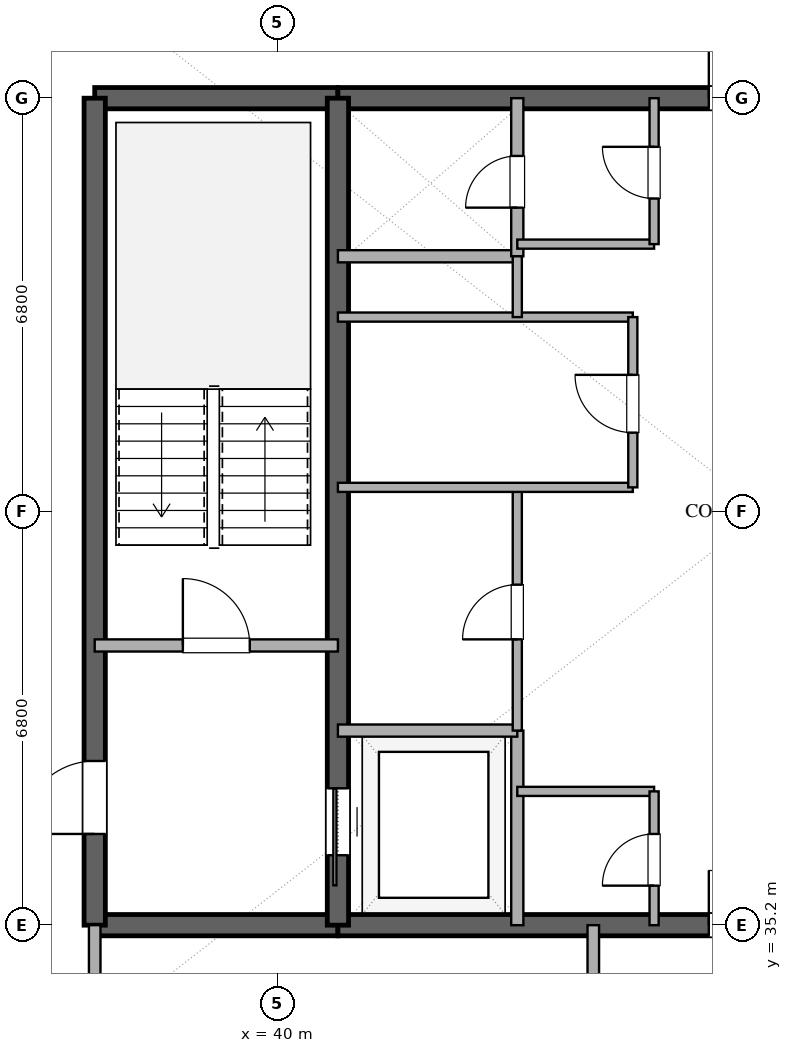
"""IFC4 building model, lengths in metres.
Left out: names, types, materials, properties, quantities, classifications, styles, units other than length and angle.
Written with IfcOpenShell. Run it as: python <this file> out.ifc"""

import sys

from ifc_helpers import new_model, si_unit, direction, frame, frame_2d, origin, place, context, subcontext, project, spatial, rectangle, extrude, element, fill, save


model = new_model("IFC4")
c1 = context("Model", 3, precision=1e-05, world=origin(), true_north=direction((0.0, 1.0)))
c2 = subcontext(c1, "Body", "Model", "MODEL_VIEW")
j1 = project(units=[si_unit("LENGTHUNIT", "METRE"), si_unit("PLANEANGLEUNIT", "RADIAN")], contexts=[c1])
p1 = place(None, origin())
s1 = spatial("IfcSite", under=j1, at=p1, CompositionType="ELEMENT")
p2 = place(p1, origin())
s2 = spatial("IfcBuilding", under=s1, at=p2, CompositionType="ELEMENT")
p3 = place(p2, frame((0.0, 0.0, 309.0)))
s3 = spatial("IfcBuildingStorey", under=s2, at=p3, CompositionType="ELEMENT", Elevation=309.0)
p4 = place(p3, frame((37.0, 35.2, 0.0), z_axis=(0.0, 0.0, 1.0), x_axis=(1.0, 0.0, 0.0)))
e1 = element("IfcWall", 1, at=p4, inside=s3, PredefinedType="SHEAR", context=c2, shape_type="SweptSolid", body=[
    extrude(rectangle(XDim=4.0, YDim=0.35, at=frame_2d((2.0, 0.0))), origin(), (0.0, 0.0, 1.0), 3.37),
])
p5 = place(p3, frame((41.0, 35.2, 0.0), z_axis=(0.0, 0.0, 1.0), x_axis=(1.0, 0.0, 0.0)))
e2 = element("IfcWall", 2, at=p5, inside=s3, PredefinedType="SHEAR", context=c2, shape_type="SweptSolid", body=[
    extrude(rectangle(XDim=14.0, YDim=0.35, at=frame_2d((7.0, 0.0))), origin(), (0.0, 0.0, 1.0), 3.37),
])
p6 = place(p5, frame((6.1, 0.0, 0.0)))
e3 = element("IfcOpeningElement", 3, at=p6, cuts=e2, PredefinedType="OPENING", context=c2, shape_type="SweptSolid", body=[
    extrude(rectangle(XDim=1.8, YDim=2.25, at=frame_2d((0.9, 1.125))), frame((0.0, 0.185, 0.0), z_axis=(0.0, -1.0, 0.0), x_axis=(1.0, 0.0, 0.0)), (0.0, 0.0, 1.0), 0.37),
])
p7 = place(p3, frame((37.0, 48.8, 0.0), z_axis=(0.0, 0.0, 1.0), x_axis=(1.0, 0.0, 0.0)))
e4 = element("IfcWall", 4, at=p7, inside=s3, PredefinedType="SHEAR", context=c2, shape_type="SweptSolid", body=[
    extrude(rectangle(XDim=4.0, YDim=0.35, at=frame_2d((2.0, 0.0))), origin(), (0.0, 0.0, 1.0), 3.37),
])
p8 = place(p3, frame((41.0, 48.8, 0.0), z_axis=(0.0, 0.0, 1.0), x_axis=(1.0, 0.0, 0.0)))
e5 = element("IfcWall", 5, at=p8, inside=s3, PredefinedType="SHEAR", context=c2, shape_type="SweptSolid", body=[
    extrude(rectangle(XDim=14.0, YDim=0.35, at=frame_2d((7.0, 0.0))), origin(), (0.0, 0.0, 1.0), 3.37),
])
p9 = place(p8, frame((6.1, 0.0, 0.0)))
e6 = element("IfcOpeningElement", 6, at=p9, cuts=e5, PredefinedType="OPENING", context=c2, shape_type="SweptSolid", body=[
    extrude(rectangle(XDim=1.8, YDim=2.25, at=frame_2d((0.9, 1.125))), frame((0.0, 0.185, 0.0), z_axis=(0.0, -1.0, 0.0), x_axis=(1.0, 0.0, 0.0)), (0.0, 0.0, 1.0), 0.37),
])
p10 = place(p3, frame((37.0, 35.2, 0.0), z_axis=(0.0, 0.0, 1.0), x_axis=(0.0, 1.0, 0.0)))
e7 = element("IfcWall", 7, at=p10, inside=s3, PredefinedType="SHEAR", context=c2, shape_type="SweptSolid", body=[
    extrude(rectangle(XDim=13.6, YDim=0.35, at=frame_2d((6.8, 0.0))), origin(), (0.0, 0.0, 1.0), 3.37),
])
p11 = place(p10, frame((1.5, 0.0, 0.0)))
e8 = element("IfcOpeningElement", 8, at=p11, cuts=e7, PredefinedType="OPENING", context=c2, shape_type="SweptSolid", body=[
    extrude(rectangle(XDim=1.2, YDim=2.15, at=frame_2d((0.6, 1.075))), frame((0.0, 0.185, 0.0), z_axis=(0.0, -1.0, 0.0), x_axis=(1.0, 0.0, 0.0)), (0.0, 0.0, 1.0), 0.37),
])
p12 = place(p3, frame((41.0, 35.2, 0.0), z_axis=(0.0, 0.0, 1.0), x_axis=(0.0, 1.0, 0.0)))
e9 = element("IfcWall", 9, at=p12, inside=s3, PredefinedType="SHEAR", context=c2, shape_type="SweptSolid", body=[
    extrude(rectangle(XDim=13.6, YDim=0.35, at=frame_2d((6.8, 0.0))), origin(), (0.0, 0.0, 1.0), 3.37),
])
p13 = place(p12, frame((1.15, 0.0, 0.0)))
e10 = element("IfcOpeningElement", 10, at=p13, cuts=e9, PredefinedType="OPENING", context=c2, shape_type="SweptSolid", body=[
    extrude(rectangle(XDim=1.1, YDim=2.2, at=frame_2d((0.55, 1.1))), frame((0.0, 0.185, 0.0), z_axis=(0.0, -1.0, 0.0), x_axis=(1.0, 0.0, 0.0)), (0.0, 0.0, 1.0), 0.37),
])
p14 = place(p3, frame((37.0, 39.8, 0.0), z_axis=(0.0, 0.0, 1.0), x_axis=(1.0, 0.0, 0.0)))
e11 = element("IfcWall", 11, at=p14, inside=s3, PredefinedType="SOLIDWALL", context=c2, shape_type="SweptSolid", body=[
    extrude(rectangle(XDim=4.0, YDim=0.2, at=frame_2d((2.0, 0.0))), origin(), (0.0, 0.0, 1.0), 2.73),
])
p15 = place(p14, frame((1.45, 0.0, 0.0)))
e12 = element("IfcOpeningElement", 12, at=p15, cuts=e11, PredefinedType="OPENING", context=c2, shape_type="SweptSolid", body=[
    extrude(rectangle(XDim=1.1, YDim=2.15, at=frame_2d((0.55, 1.075))), frame((0.0, 0.11, 0.0), z_axis=(0.0, -1.0, 0.0), x_axis=(1.0, 0.0, 0.0)), (0.0, 0.0, 1.0), 0.22),
])
p16 = place(p3, frame((43.95, 35.2, 0.0), z_axis=(0.0, 0.0, 1.0), x_axis=(0.0, 1.0, 0.0)))
e13 = element("IfcWall", 13, at=p16, inside=s3, PredefinedType="SOLIDWALL", context=c2, shape_type="SweptSolid", body=[
    extrude(rectangle(XDim=3.2, YDim=0.2, at=frame_2d((1.6, 0.0))), origin(), (0.0, 0.0, 1.0), 2.73),
])
for number, where, z_axis, x_axis in (
    (14, (41.0, 38.4, 0.0), (0.0, 0.0, 1.0), (1.0, 0.0, 0.0)),
    (15, (41.0, 46.2, 0.0), (0.0, 0.0, 1.0), (1.0, 0.0, 0.0)),
):
    element("IfcWall", number, at=place(p3, frame(where, z_axis=z_axis, x_axis=x_axis)), inside=s3, PredefinedType="SOLIDWALL", context=c2, shape_type="SweptSolid", body=[
        extrude(rectangle(XDim=2.95, YDim=0.2, at=frame_2d((1.475, 0.0))), origin(), (0.0, 0.0, 1.0), 2.73),
    ])
p17 = place(p3, frame((43.95, 46.2, 0.0), z_axis=(0.0, 0.0, 1.0), x_axis=(0.0, 1.0, 0.0)))
e16 = element("IfcWall", 16, at=p17, inside=s3, PredefinedType="SOLIDWALL", context=c2, shape_type="SweptSolid", body=[
    extrude(rectangle(XDim=2.6, YDim=0.2, at=frame_2d((1.3, 0.0))), origin(), (0.0, 0.0, 1.0), 2.73),
])
p18 = place(p17, frame((0.8, 0.0, 0.0)))
e17 = element("IfcOpeningElement", 17, at=p18, cuts=e16, PredefinedType="OPENING", context=c2, shape_type="SweptSolid", body=[
    extrude(rectangle(XDim=0.85, YDim=2.15, at=frame_2d((0.425, 1.075))), frame((0.0, 0.11, 0.0), z_axis=(0.0, -1.0, 0.0), x_axis=(1.0, 0.0, 0.0)), (0.0, 0.0, 1.0), 0.22),
])
p19 = place(p3, frame((43.95, 38.4, 0.0), z_axis=(0.0, 0.0, 1.0), x_axis=(0.0, 1.0, 0.0)))
e18 = element("IfcWall", 18, at=p19, inside=s3, PredefinedType="PARTITIONING", context=c2, shape_type="SweptSolid", body=[
    extrude(rectangle(XDim=4.0, YDim=0.15, at=frame_2d((2.0, 0.0))), origin(), (0.0, 0.0, 1.0), 2.73),
])
p20 = place(p19, frame((1.5, 0.0, 0.0)))
e19 = element("IfcOpeningElement", 19, at=p20, cuts=e18, PredefinedType="OPENING", context=c2, shape_type="SweptSolid", body=[
    extrude(rectangle(XDim=0.9, YDim=2.15, at=frame_2d((0.45, 1.075))), frame((0.0, 0.085, 0.0), z_axis=(0.0, -1.0, 0.0), x_axis=(1.0, 0.0, 0.0)), (0.0, 0.0, 1.0), 0.17),
])
for number, where, z_axis, x_axis in (
    (20, (41.0, 42.4, 0.0), (0.0, 0.0, 1.0), (1.0, 0.0, 0.0)),
    (21, (41.0, 45.2, 0.0), (0.0, 0.0, 1.0), (1.0, 0.0, 0.0)),
):
    element("IfcWall", number, at=place(p3, frame(where, z_axis=z_axis, x_axis=x_axis)), inside=s3, PredefinedType="PARTITIONING", context=c2, shape_type="SweptSolid", body=[
        extrude(rectangle(XDim=4.85, YDim=0.15, at=frame_2d((2.425, 0.0))), origin(), (0.0, 0.0, 1.0), 2.73),
    ])
p21 = place(p3, frame((43.95, 45.2, 0.0), z_axis=(0.0, 0.0, 1.0), x_axis=(0.0, 1.0, 0.0)))
e22 = element("IfcWall", 22, at=p21, inside=s3, PredefinedType="PARTITIONING", context=c2, shape_type="SweptSolid", body=[
    extrude(rectangle(XDim=1.0, YDim=0.15, at=frame_2d((0.5, 0.0))), origin(), (0.0, 0.0, 1.0), 2.73),
])
p22 = place(p3, frame((45.85, 42.4, 0.0), z_axis=(0.0, 0.0, 1.0), x_axis=(0.0, 1.0, 0.0)))
e23 = element("IfcWall", 23, at=p22, inside=s3, PredefinedType="PARTITIONING", context=c2, shape_type="SweptSolid", body=[
    extrude(rectangle(XDim=2.8, YDim=0.15, at=frame_2d((1.4, 0.0))), origin(), (0.0, 0.0, 1.0), 2.73),
])
p23 = place(p22, frame((0.9, 0.0, 0.0)))
e24 = element("IfcOpeningElement", 24, at=p23, cuts=e23, PredefinedType="OPENING", context=c2, shape_type="SweptSolid", body=[
    extrude(rectangle(XDim=0.95, YDim=2.15, at=frame_2d((0.475, 1.075))), frame((0.0, 0.085, 0.0), z_axis=(0.0, -1.0, 0.0), x_axis=(1.0, 0.0, 0.0)), (0.0, 0.0, 1.0), 0.17),
])
p24 = place(p3, frame((43.95, 37.4, 0.0), z_axis=(0.0, 0.0, 1.0), x_axis=(1.0, 0.0, 0.0)))
e25 = element("IfcWall", 25, at=p24, inside=s3, PredefinedType="PARTITIONING", context=c2, shape_type="SweptSolid", body=[
    extrude(rectangle(XDim=2.25, YDim=0.15, at=frame_2d((1.125, 0.0))), origin(), (0.0, 0.0, 1.0), 2.73),
])
p25 = place(p3, frame((46.2, 35.2, 0.0), z_axis=(0.0, 0.0, 1.0), x_axis=(0.0, 1.0, 0.0)))
e26 = element("IfcWall", 26, at=p25, inside=s3, PredefinedType="PARTITIONING", context=c2, shape_type="SweptSolid", body=[
    extrude(rectangle(XDim=2.2, YDim=0.15, at=frame_2d((1.1, 0.0))), origin(), (0.0, 0.0, 1.0), 2.73),
])
p26 = place(p25, frame((0.65, 0.0, 0.0)))
e27 = element("IfcOpeningElement", 27, at=p26, cuts=e26, PredefinedType="OPENING", context=c2, shape_type="SweptSolid", body=[
    extrude(rectangle(XDim=0.85, YDim=2.15, at=frame_2d((0.425, 1.075))), frame((0.0, 0.085, 0.0), z_axis=(0.0, -1.0, 0.0), x_axis=(1.0, 0.0, 0.0)), (0.0, 0.0, 1.0), 0.17),
])
p27 = place(p3, frame((43.95, 46.4, 0.0), z_axis=(0.0, 0.0, 1.0), x_axis=(1.0, 0.0, 0.0)))
e28 = element("IfcWall", 28, at=p27, inside=s3, PredefinedType="PARTITIONING", context=c2, shape_type="SweptSolid", body=[
    extrude(rectangle(XDim=2.25, YDim=0.15, at=frame_2d((1.125, 0.0))), origin(), (0.0, 0.0, 1.0), 2.73),
])
p28 = place(p3, frame((46.2, 46.4, 0.0), z_axis=(0.0, 0.0, 1.0), x_axis=(0.0, 1.0, 0.0)))
e29 = element("IfcWall", 29, at=p28, inside=s3, PredefinedType="PARTITIONING", context=c2, shape_type="SweptSolid", body=[
    extrude(rectangle(XDim=2.4, YDim=0.15, at=frame_2d((1.2, 0.0))), origin(), (0.0, 0.0, 1.0), 2.73),
])
p29 = place(p28, frame((0.75, 0.0, 0.0)))
e30 = element("IfcOpeningElement", 30, at=p29, cuts=e29, PredefinedType="OPENING", context=c2, shape_type="SweptSolid", body=[
    extrude(rectangle(XDim=0.85, YDim=2.15, at=frame_2d((0.425, 1.075))), frame((0.0, 0.085, 0.0), z_axis=(0.0, -1.0, 0.0), x_axis=(1.0, 0.0, 0.0)), (0.0, 0.0, 1.0), 0.17),
])
p30 = place(p3, frame((45.2, 33.1, 0.0), z_axis=(0.0, 0.0, 1.0), x_axis=(0.0, 1.0, 0.0)))
e31 = element("IfcWall", 31, at=p30, inside=s3, PredefinedType="PARTITIONING", context=c2, shape_type="SweptSolid", body=[
    extrude(rectangle(XDim=2.1, YDim=0.19, at=frame_2d((1.05, 0.0))), origin(), (0.0, 0.0, 1.0), 2.73),
])
p31 = place(p3, frame((37.0, 34.0, 0.0), z_axis=(0.0, 0.0, 1.0), x_axis=(0.0, 1.0, 0.0)))
e32 = element("IfcWall", 32, at=p31, inside=s3, PredefinedType="PARTITIONING", context=c2, shape_type="SweptSolid", body=[
    extrude(rectangle(XDim=1.2, YDim=0.19, at=frame_2d((0.6, 0.0))), origin(), (0.0, 0.0, 1.0), 2.73),
])
p32 = place(p13, origin())
e33 = element("IfcDoor", 33, at=p32, inside=s3, OperationType="SLIDING_TO_LEFT", PredefinedType="DOOR", context=c2, shape_type="SweptSolid", body=[
    extrude(rectangle(XDim=1.1, YDim=2.2, at=frame_2d((0.55, 1.1))), frame((0.0, 0.025, 0.0), z_axis=(0.0, -1.0, 0.0), x_axis=(1.0, 0.0, 0.0)), (0.0, 0.0, 1.0), 0.05),
])
fill(e10, e33)
p33 = place(p11, origin())
e34 = element("IfcDoor", 34, at=p33, inside=s3, OperationType="SINGLE_SWING_LEFT", PredefinedType="DOOR", context=c2, shape_type="SweptSolid", body=[
    extrude(rectangle(XDim=1.2, YDim=2.15, at=frame_2d((0.6, 1.075))), frame((0.0, 0.025, 0.0), z_axis=(0.0, -1.0, 0.0), x_axis=(1.0, 0.0, 0.0)), (0.0, 0.0, 1.0), 0.05),
])
fill(e8, e34)
p34 = place(p6, origin())
e35 = element("IfcDoor", 35, at=p34, inside=s3, OperationType="DOUBLE_DOOR_SINGLE_SWING", PredefinedType="DOOR", context=c2, shape_type="SweptSolid", body=[
    extrude(rectangle(XDim=1.8, YDim=2.25, at=frame_2d((0.9, 1.125))), frame((0.0, 0.025, 0.0), z_axis=(0.0, -1.0, 0.0), x_axis=(1.0, 0.0, 0.0)), (0.0, 0.0, 1.0), 0.05),
])
fill(e3, e35)
p35 = place(p9, origin())
e36 = element("IfcDoor", 36, at=p35, inside=s3, OperationType="DOUBLE_DOOR_SINGLE_SWING", PredefinedType="DOOR", context=c2, shape_type="SweptSolid", body=[
    extrude(rectangle(XDim=1.8, YDim=2.25, at=frame_2d((0.9, 1.125))), frame((0.0, 0.025, 0.0), z_axis=(0.0, -1.0, 0.0), x_axis=(1.0, 0.0, 0.0)), (0.0, 0.0, 1.0), 0.05),
])
fill(e6, e36)
p36 = place(p15, origin())
e37 = element("IfcDoor", 37, at=p36, inside=s3, OperationType="SINGLE_SWING_LEFT", PredefinedType="DOOR", context=c2, shape_type="SweptSolid", body=[
    extrude(rectangle(XDim=1.1, YDim=2.15, at=frame_2d((0.55, 1.075))), frame((0.0, 0.025, 0.0), z_axis=(0.0, -1.0, 0.0), x_axis=(1.0, 0.0, 0.0)), (0.0, 0.0, 1.0), 0.05),
])
fill(e12, e37)
p37 = place(p18, origin())
e38 = element("IfcDoor", 38, at=p37, inside=s3, OperationType="SINGLE_SWING_LEFT", PredefinedType="DOOR", context=c2, shape_type="SweptSolid", body=[
    extrude(rectangle(XDim=0.85, YDim=2.15, at=frame_2d((0.425, 1.075))), frame((0.0, 0.025, 0.0), z_axis=(0.0, -1.0, 0.0), x_axis=(1.0, 0.0, 0.0)), (0.0, 0.0, 1.0), 0.05),
])
fill(e17, e38)
p38 = place(p20, origin())
e39 = element("IfcDoor", 39, at=p38, inside=s3, OperationType="SINGLE_SWING_LEFT", PredefinedType="DOOR", context=c2, shape_type="SweptSolid", body=[
    extrude(rectangle(XDim=0.9, YDim=2.15, at=frame_2d((0.45, 1.075))), frame((0.0, 0.025, 0.0), z_axis=(0.0, -1.0, 0.0), x_axis=(1.0, 0.0, 0.0)), (0.0, 0.0, 1.0), 0.05),
])
fill(e19, e39)
p39 = place(p23, origin())
e40 = element("IfcDoor", 40, at=p39, inside=s3, OperationType="SINGLE_SWING_RIGHT", PredefinedType="DOOR", context=c2, shape_type="SweptSolid", body=[
    extrude(rectangle(XDim=0.95, YDim=2.15, at=frame_2d((0.475, 1.075))), frame((0.0, 0.025, 0.0), z_axis=(0.0, -1.0, 0.0), x_axis=(1.0, 0.0, 0.0)), (0.0, 0.0, 1.0), 0.05),
])
fill(e24, e40)
p40 = place(p26, origin())
e41 = element("IfcDoor", 41, at=p40, inside=s3, OperationType="SINGLE_SWING_LEFT", PredefinedType="DOOR", context=c2, shape_type="SweptSolid", body=[
    extrude(rectangle(XDim=0.85, YDim=2.15, at=frame_2d((0.425, 1.075))), frame((0.0, 0.025, 0.0), z_axis=(0.0, -1.0, 0.0), x_axis=(1.0, 0.0, 0.0)), (0.0, 0.0, 1.0), 0.05),
])
fill(e27, e41)
p41 = place(p29, origin())
e42 = element("IfcDoor", 42, at=p41, inside=s3, OperationType="SINGLE_SWING_RIGHT", PredefinedType="DOOR", context=c2, shape_type="SweptSolid", body=[
    extrude(rectangle(XDim=0.85, YDim=2.15, at=frame_2d((0.425, 1.075))), frame((0.0, 0.025, 0.0), z_axis=(0.0, -1.0, 0.0), x_axis=(1.0, 0.0, 0.0)), (0.0, 0.0, 1.0), 0.05),
])
fill(e30, e42)
save(model, sys.argv[1])
